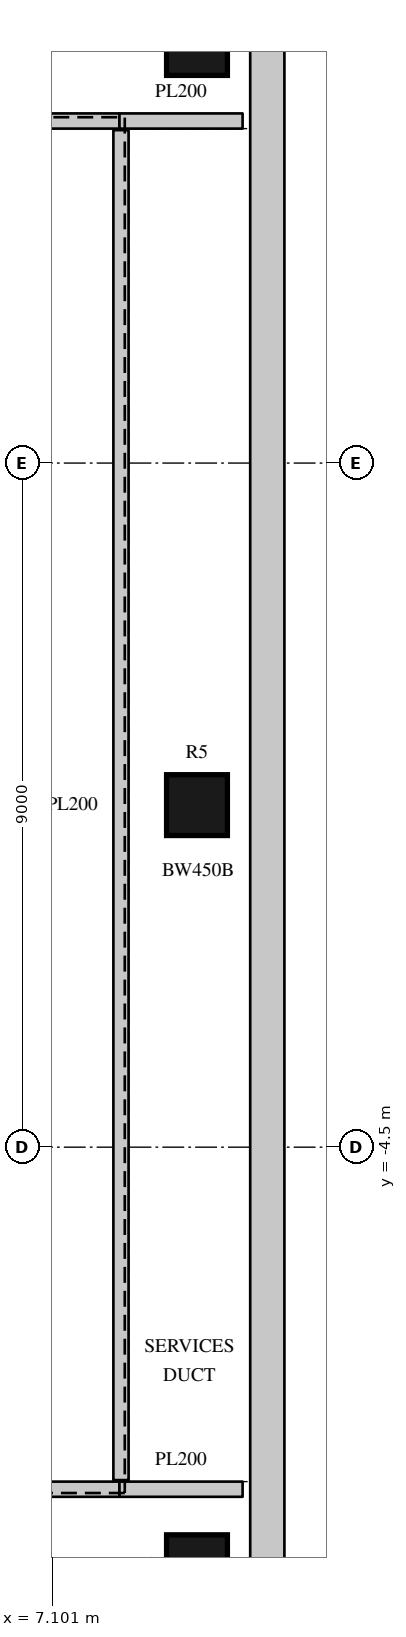
"""IFC4 building model, lengths in metres.
Left out: names, types, materials, properties, quantities, classifications, styles, units other than length and angle.
Written with IfcOpenShell. Run it as: python <this file> out.ifc"""

import sys

from ifc_helpers import new_model, si_unit, direction, frame, frame_2d, origin, origin_2d, place, context, subcontext, project, spatial, rectangle, circle, extrude, element, save


model = new_model("IFC4")
c1 = context("Model", 3, precision=1e-05, world=origin(), true_north=direction((0.0, 1.0)))
c2 = subcontext(c1, "Body", "Model", "MODEL_VIEW")
j1 = project(units=[si_unit("LENGTHUNIT", "METRE"), si_unit("PLANEANGLEUNIT", "RADIAN")], contexts=[c1])
p1 = place(None, origin())
s1 = spatial("IfcSite", under=j1, at=p1, CompositionType="ELEMENT")
p2 = place(p1, origin())
s2 = spatial("IfcBuilding", under=s1, at=p2, CompositionType="ELEMENT")
p3 = place(p2, frame((0.0, 0.0, 351.0)))
s3 = spatial("IfcBuildingStorey", under=s2, at=p3, CompositionType="ELEMENT", Elevation=351.0)
for number, where, z_axis, x_axis in (
    (1, (9.0, -10.0, 0.0), (0.0, 0.0, 1.0), (1.0, 0.0, 0.0)),
    (2, (9.0, 0.0, 0.0), (0.0, 0.0, 1.0), (1.0, 0.0, 0.0)),
    (3, (9.0, 10.0, 0.0), (0.0, 0.0, 1.0), (1.0, 0.0, 0.0)),
):
    element("IfcColumn", number, at=place(p3, frame(where, z_axis=z_axis, x_axis=x_axis)), inside=s3, PredefinedType="COLUMN", context=c2, shape_type="SweptSolid", body=[
        extrude(circle(Radius=0.4, at=origin_2d()), origin(), (0.0, 0.0, 1.0), 4.0),
    ])
p4 = place(p3, frame((9.925, -12.99, 0.0), z_axis=(0.0, 0.0, 1.0), x_axis=(0.0, 1.0, 0.0)))
e4 = element("IfcWall", 4, at=p4, inside=s3, PredefinedType="SOLIDWALL", context=c2, shape_type="SweptSolid", body=[
    extrude(rectangle(XDim=24.229, YDim=0.45, at=frame_2d((12.115, 0.0))), origin(), (0.0, 0.0, 1.0), 3.7),
])
for number, where, z_axis, x_axis in (
    (5, (-5.98, -9.0, 0.0), (0.0, 0.0, 1.0), (1.0, 0.0, 0.0)),
    (6, (-5.98, 9.0, 0.0), (0.0, 0.0, 1.0), (1.0, 0.0, 0.0)),
):
    element("IfcWall", number, at=place(p3, frame(where, z_axis=z_axis, x_axis=x_axis)), inside=s3, PredefinedType="PARTITIONING", context=c2, shape_type="SweptSolid", body=[
        extrude(rectangle(XDim=13.96, YDim=0.2, at=frame_2d((6.98, 0.0))), origin(), (0.0, 0.0, 1.0), 3.598),
    ])
for number, where, z_axis, x_axis in (
    (7, (7.98, -9.0, 0.0), (0.0, 0.0, 1.0), (1.0, 0.0, 0.0)),
    (8, (7.98, 9.0, 0.0), (0.0, 0.0, 1.0), (1.0, 0.0, 0.0)),
):
    element("IfcWall", number, at=place(p3, frame(where, z_axis=z_axis, x_axis=x_axis)), inside=s3, PredefinedType="PARTITIONING", context=c2, shape_type="SweptSolid", body=[
        extrude(rectangle(XDim=1.62, YDim=0.2, at=frame_2d((0.81, 0.0))), origin(), (0.0, 0.0, 1.0), 3.598),
    ])
p5 = place(p3, frame((8.0, -8.88, 0.0), z_axis=(0.0, 0.0, 1.0), x_axis=(0.0, 1.0, 0.0)))
e9 = element("IfcWall", 9, at=p5, inside=s3, PredefinedType="PARTITIONING", context=c2, shape_type="SweptSolid", body=[
    extrude(rectangle(XDim=17.76, YDim=0.2, at=frame_2d((8.88, 0.0))), origin(), (0.0, 0.0, 1.0), 3.598),
])
save(model, sys.argv[1])
